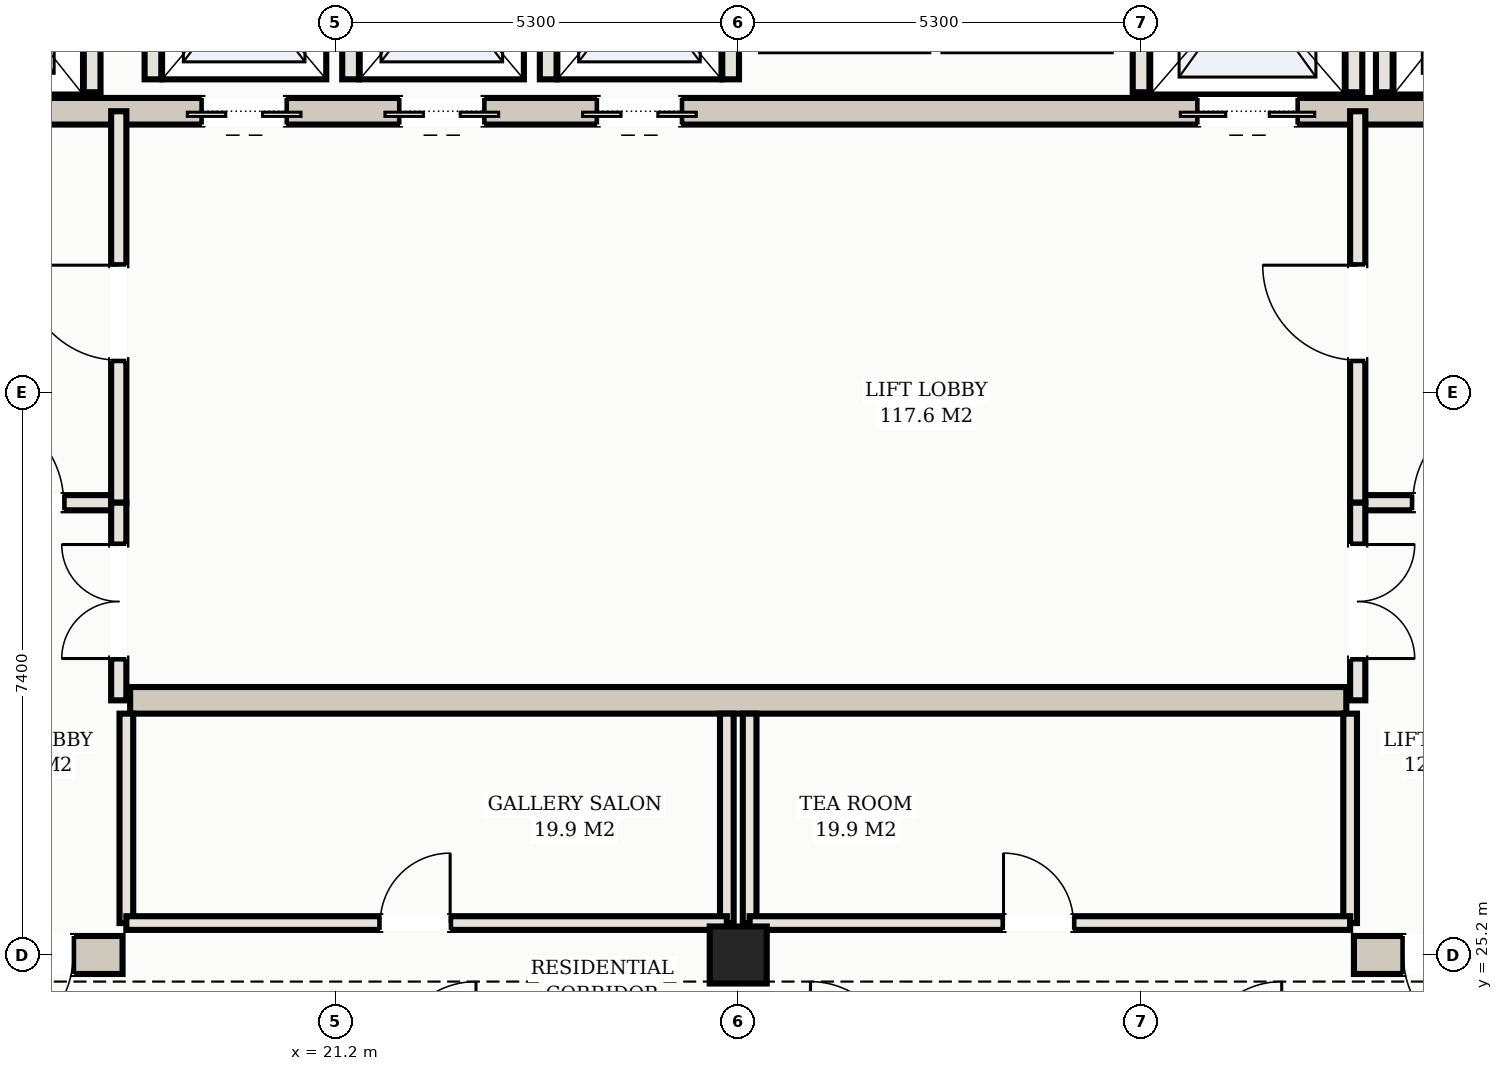
"""IFC4 building model, lengths in metres.
Left out: names, types, materials, properties, quantities, classifications, styles, units other than length and angle.
Written with IfcOpenShell. Run it as: python <this file> out.ifc"""

import sys

from ifc_helpers import new_model, si_unit, direction, frame, frame_2d, origin, origin_2d, place, context, subcontext, project, spatial, rectangle, hollow_rectangle, extrude, element, fill, save


model = new_model("IFC4")
c1 = context("Model", 3, precision=1e-05, world=origin(), true_north=direction((0.0, 1.0)))
c2 = subcontext(c1, "Body", "Model", "MODEL_VIEW")
j1 = project(units=[si_unit("LENGTHUNIT", "METRE"), si_unit("PLANEANGLEUNIT", "RADIAN")], contexts=[c1])
p1 = place(None, origin())
s1 = spatial("IfcSite", under=j1, at=p1, CompositionType="ELEMENT")
p2 = place(p1, origin())
s2 = spatial("IfcBuilding", under=s1, at=p2, CompositionType="ELEMENT")
p3 = place(p2, frame((0.0, 0.0, 233.0)))
s3 = spatial("IfcBuildingStorey", under=s2, at=p3, CompositionType="ELEMENT", Elevation=233.0)
p4 = place(p3, frame((10.35, 25.2, 0.0), z_axis=(0.0, 0.0, 1.0), x_axis=(1.0, 0.0, 0.0)))
e1 = element("IfcWall", 1, at=p4, inside=s3, PredefinedType="SHEAR", context=c2, shape_type="SweptSolid", body=[
    extrude(rectangle(XDim=8.05, YDim=0.5, at=frame_2d((4.025, 0.0))), origin(), (0.0, 0.0, 1.0), 3.11),
])
p5 = place(p4, frame((6.15, 0.0, 0.0)))
e2 = element("IfcOpeningElement", 2, at=p5, cuts=e1, PredefinedType="OPENING", context=c2, shape_type="SweptSolid", body=[
    extrude(rectangle(XDim=1.25, YDim=2.2, at=frame_2d((0.625, 1.1))), frame((0.0, 0.26, 0.0), z_axis=(0.0, -1.0, 0.0), x_axis=(1.0, 0.0, 0.0)), (0.0, 0.0, 1.0), 0.52),
])
p6 = place(p3, frame((34.6, 25.2, 0.0), z_axis=(0.0, 0.0, 1.0), x_axis=(1.0, 0.0, 0.0)))
e3 = element("IfcWall", 3, at=p6, inside=s3, PredefinedType="SHEAR", context=c2, shape_type="SweptSolid", body=[
    extrude(rectangle(XDim=8.05, YDim=0.5, at=frame_2d((4.025, 0.0))), origin(), (0.0, 0.0, 1.0), 3.11),
])
p7 = place(p6, frame((0.65, 0.0, 0.0)))
e4 = element("IfcOpeningElement", 4, at=p7, cuts=e3, PredefinedType="OPENING", context=c2, shape_type="SweptSolid", body=[
    extrude(rectangle(XDim=1.25, YDim=2.2, at=frame_2d((0.625, 1.1))), frame((0.0, 0.26, 0.0), z_axis=(0.0, -1.0, 0.0), x_axis=(1.0, 0.0, 0.0)), (0.0, 0.0, 1.0), 0.52),
])
p8 = place(p3, frame((15.5, 36.3, 0.0), z_axis=(0.0, 0.0, 1.0), x_axis=(1.0, 0.0, 0.0)))
e5 = element("IfcWall", 5, at=p8, inside=s3, PredefinedType="SHEAR", context=c2, shape_type="SweptSolid", body=[
    extrude(rectangle(XDim=22.0, YDim=0.35, at=frame_2d((11.0, 0.0))), origin(), (0.0, 0.0, 1.0), 3.11),
])
p9 = place(p8, frame((0.65, 0.0, 0.0)))
e6 = element("IfcOpeningElement", 6, at=p9, cuts=e5, PredefinedType="OPENING", context=c2, shape_type="SweptSolid", body=[
    extrude(rectangle(XDim=1.1, YDim=2.15, at=frame_2d((0.55, 1.075))), frame((0.0, 0.185, 0.0), z_axis=(0.0, -1.0, 0.0), x_axis=(1.0, 0.0, 0.0)), (0.0, 0.0, 1.0), 0.37),
])
p10 = place(p8, frame((20.25, 0.0, 0.0)))
e7 = element("IfcOpeningElement", 7, at=p10, cuts=e5, PredefinedType="OPENING", context=c2, shape_type="SweptSolid", body=[
    extrude(rectangle(XDim=1.1, YDim=2.15, at=frame_2d((0.55, 1.075))), frame((0.0, 0.185, 0.0), z_axis=(0.0, -1.0, 0.0), x_axis=(1.0, 0.0, 0.0)), (0.0, 0.0, 1.0), 0.37),
])
p11 = place(p8, frame((17.05, 0.0, 0.0)))
e8 = element("IfcOpeningElement", 8, at=p11, cuts=e5, PredefinedType="OPENING", context=c2, shape_type="SweptSolid", body=[
    extrude(rectangle(XDim=1.3, YDim=2.2, at=frame_2d((0.65, 1.1))), frame((0.0, 0.185, 0.0), z_axis=(0.0, -1.0, 0.0), x_axis=(1.0, 0.0, 0.0)), (0.0, 0.0, 1.0), 0.37),
])
p12 = place(p8, frame((3.95, 0.0, 0.0)))
e9 = element("IfcOpeningElement", 9, at=p12, cuts=e5, PredefinedType="OPENING", context=c2, shape_type="SweptSolid", body=[
    extrude(rectangle(XDim=1.1, YDim=2.15, at=frame_2d((0.55, 1.075))), frame((0.0, 0.185, 0.0), z_axis=(0.0, -1.0, 0.0), x_axis=(1.0, 0.0, 0.0)), (0.0, 0.0, 1.0), 0.37),
])
p13 = place(p8, frame((6.55, 0.0, 0.0)))
e10 = element("IfcOpeningElement", 10, at=p13, cuts=e5, PredefinedType="OPENING", context=c2, shape_type="SweptSolid", body=[
    extrude(rectangle(XDim=1.1, YDim=2.15, at=frame_2d((0.55, 1.075))), frame((0.0, 0.185, 0.0), z_axis=(0.0, -1.0, 0.0), x_axis=(1.0, 0.0, 0.0)), (0.0, 0.0, 1.0), 0.37),
])
p14 = place(p8, frame((9.15, 0.0, 0.0)))
e11 = element("IfcOpeningElement", 11, at=p14, cuts=e5, PredefinedType="OPENING", context=c2, shape_type="SweptSolid", body=[
    extrude(rectangle(XDim=1.1, YDim=2.15, at=frame_2d((0.55, 1.075))), frame((0.0, 0.185, 0.0), z_axis=(0.0, -1.0, 0.0), x_axis=(1.0, 0.0, 0.0)), (0.0, 0.0, 1.0), 0.37),
])
p15 = place(p3, frame((18.5, 28.55, 0.0), z_axis=(0.0, 0.0, 1.0), x_axis=(1.0, 0.0, 0.0)))
e12 = element("IfcWall", 12, at=p15, inside=s3, PredefinedType="SHEAR", context=c2, shape_type="SweptSolid", body=[
    extrude(rectangle(XDim=16.0, YDim=0.35, at=frame_2d((8.0, 0.0))), origin(), (0.0, 0.0, 1.0), 3.11),
])
p16 = place(p3, frame((26.5, 25.2, 0.0), z_axis=(0.0, 0.0, 1.0), x_axis=(1.0, 0.0, 0.0)))
e13 = element("IfcColumn", 13, at=p16, inside=s3, PredefinedType="COLUMN", context=c2, shape_type="SweptSolid", body=[
    extrude(hollow_rectangle(XDim=0.75, YDim=0.75, WallThickness=0.025, at=origin_2d()), origin(), (0.0, 0.0, 1.0), 3.3),
])
for number, where, z_axis, x_axis in (
    (14, (18.0, 36.55, 0.0), (0.0, 0.0, 1.0), (0.0, 1.0, 0.0)),
    (15, (35.0, 36.55, 0.0), (0.0, 0.0, 1.0), (0.0, 1.0, 0.0)),
    (16, (31.8, 36.55, 0.0), (0.0, 0.0, 1.0), (0.0, 1.0, 0.0)),
    (17, (34.6, 36.55, 0.0), (0.0, 0.0, 1.0), (0.0, 1.0, 0.0)),
):
    element("IfcWall", number, at=place(p3, frame(where, z_axis=z_axis, x_axis=x_axis)), inside=s3, PredefinedType="SOLIDWALL", context=c2, shape_type="SweptSolid", body=[
        extrude(rectangle(XDim=2.93, YDim=0.22, at=frame_2d((1.465, 0.0))), origin(), (0.0, 0.0, 1.0), 3.11),
    ])
for number, where, z_axis, x_axis in (
    (18, (18.8, 36.72, 0.0), (0.0, 0.0, 1.0), (0.0, 1.0, 0.0)),
    (19, (21.4, 36.72, 0.0), (0.0, 0.0, 1.0), (0.0, 1.0, 0.0)),
    (20, (24.0, 36.72, 0.0), (0.0, 0.0, 1.0), (0.0, 1.0, 0.0)),
    (21, (26.4, 36.72, 0.0), (0.0, 0.0, 1.0), (0.0, 1.0, 0.0)),
):
    element("IfcWall", number, at=place(p3, frame(where, z_axis=z_axis, x_axis=x_axis)), inside=s3, PredefinedType="SOLIDWALL", context=c2, shape_type="SweptSolid", body=[
        extrude(rectangle(XDim=2.56, YDim=0.22, at=frame_2d((1.28, 0.0))), origin(), (0.0, 0.0, 1.0), 3.11),
    ])
p17 = place(p3, frame((15.1, 31.15, 0.0), z_axis=(0.0, 0.0, 1.0), x_axis=(1.0, 0.0, 0.0)))
e22 = element("IfcWall", 22, at=p17, inside=s3, PredefinedType="PARTITIONING", context=c2, shape_type="SweptSolid", body=[
    extrude(rectangle(XDim=3.25, YDim=0.2, at=frame_2d((1.625, 0.0))), origin(), (0.0, 0.0, 1.0), 2.45),
])
p18 = place(p17, frame((1.275, 0.0, 0.0)))
e23 = element("IfcOpeningElement", 23, at=p18, cuts=e22, PredefinedType="OPENING", context=c2, shape_type="SweptSolid", body=[
    extrude(rectangle(XDim=1.25, YDim=2.2, at=frame_2d((0.625, 1.1))), frame((0.0, 0.11, 0.0), z_axis=(0.0, -1.0, 0.0), x_axis=(1.0, 0.0, 0.0)), (0.0, 0.0, 1.0), 0.22),
])
p19 = place(p3, frame((18.35, 31.15, 0.0), z_axis=(0.0, 0.0, 1.0), x_axis=(0.0, 1.0, 0.0)))
e24 = element("IfcWall", 24, at=p19, inside=s3, PredefinedType="PARTITIONING", context=c2, shape_type="SweptSolid", body=[
    extrude(rectangle(XDim=5.15, YDim=0.2, at=frame_2d((2.575, 0.0))), origin(), (0.0, 0.0, 1.0), 2.45),
])
p20 = place(p19, frame((1.875, 0.0, 0.0)))
e25 = element("IfcOpeningElement", 25, at=p20, cuts=e24, PredefinedType="OPENING", context=c2, shape_type="SweptSolid", body=[
    extrude(rectangle(XDim=1.25, YDim=2.2, at=frame_2d((0.625, 1.1))), frame((0.0, 0.11, 0.0), z_axis=(0.0, -1.0, 0.0), x_axis=(1.0, 0.0, 0.0)), (0.0, 0.0, 1.0), 0.22),
])
p21 = place(p3, frame((34.65, 31.15, 0.0), z_axis=(0.0, 0.0, 1.0), x_axis=(1.0, 0.0, 0.0)))
e26 = element("IfcWall", 26, at=p21, inside=s3, PredefinedType="PARTITIONING", context=c2, shape_type="SweptSolid", body=[
    extrude(rectangle(XDim=3.25, YDim=0.2, at=frame_2d((1.625, 0.0))), origin(), (0.0, 0.0, 1.0), 2.45),
])
p22 = place(p21, frame((0.725, 0.0, 0.0)))
e27 = element("IfcOpeningElement", 27, at=p22, cuts=e26, PredefinedType="OPENING", context=c2, shape_type="SweptSolid", body=[
    extrude(rectangle(XDim=1.25, YDim=2.2, at=frame_2d((0.625, 1.1))), frame((0.0, 0.11, 0.0), z_axis=(0.0, -1.0, 0.0), x_axis=(1.0, 0.0, 0.0)), (0.0, 0.0, 1.0), 0.22),
])
p23 = place(p3, frame((34.65, 31.15, 0.0), z_axis=(0.0, 0.0, 1.0), x_axis=(0.0, 1.0, 0.0)))
e28 = element("IfcWall", 28, at=p23, inside=s3, PredefinedType="PARTITIONING", context=c2, shape_type="SweptSolid", body=[
    extrude(rectangle(XDim=5.15, YDim=0.2, at=frame_2d((2.575, 0.0))), origin(), (0.0, 0.0, 1.0), 2.45),
])
p24 = place(p23, frame((1.875, 0.0, 0.0)))
e29 = element("IfcOpeningElement", 29, at=p24, cuts=e28, PredefinedType="OPENING", context=c2, shape_type="SweptSolid", body=[
    extrude(rectangle(XDim=1.25, YDim=2.2, at=frame_2d((0.625, 1.1))), frame((0.0, 0.11, 0.0), z_axis=(0.0, -1.0, 0.0), x_axis=(1.0, 0.0, 0.0)), (0.0, 0.0, 1.0), 0.22),
])
p25 = place(p3, frame((18.35, 28.55, 0.0), z_axis=(0.0, 0.0, 1.0), x_axis=(0.0, 1.0, 0.0)))
e30 = element("IfcWall", 30, at=p25, inside=s3, PredefinedType="PARTITIONING", context=c2, shape_type="SweptSolid", body=[
    extrude(rectangle(XDim=2.6, YDim=0.2, at=frame_2d((1.3, 0.0))), origin(), (0.0, 0.0, 1.0), 2.45),
])
p26 = place(p25, frame((0.55, 0.0, 0.0)))
e31 = element("IfcOpeningElement", 31, at=p26, cuts=e30, PredefinedType="OPENING", context=c2, shape_type="SweptSolid", body=[
    extrude(rectangle(XDim=1.5, YDim=2.25, at=frame_2d((0.75, 1.125))), frame((0.0, 0.11, 0.0), z_axis=(0.0, -1.0, 0.0), x_axis=(1.0, 0.0, 0.0)), (0.0, 0.0, 1.0), 0.22),
])
p27 = place(p3, frame((34.65, 28.55, 0.0), z_axis=(0.0, 0.0, 1.0), x_axis=(0.0, 1.0, 0.0)))
e32 = element("IfcWall", 32, at=p27, inside=s3, PredefinedType="PARTITIONING", context=c2, shape_type="SweptSolid", body=[
    extrude(rectangle(XDim=2.6, YDim=0.2, at=frame_2d((1.3, 0.0))), origin(), (0.0, 0.0, 1.0), 2.45),
])
p28 = place(p27, frame((0.55, 0.0, 0.0)))
e33 = element("IfcOpeningElement", 33, at=p28, cuts=e32, PredefinedType="OPENING", context=c2, shape_type="SweptSolid", body=[
    extrude(rectangle(XDim=1.5, YDim=2.25, at=frame_2d((0.75, 1.125))), frame((0.0, 0.11, 0.0), z_axis=(0.0, -1.0, 0.0), x_axis=(1.0, 0.0, 0.0)), (0.0, 0.0, 1.0), 0.22),
])
for number, where, z_axis, x_axis in (
    (34, (18.45, 25.62, 0.0), (0.0, 0.0, 1.0), (0.0, 1.0, 0.0)),
    (35, (26.35, 25.62, 0.0), (0.0, 0.0, 1.0), (0.0, 1.0, 0.0)),
):
    element("IfcWall", number, at=place(p3, frame(where, z_axis=z_axis, x_axis=x_axis)), inside=s3, PredefinedType="PARTITIONING", context=c2, shape_type="SweptSolid", body=[
        extrude(rectangle(XDim=2.755, YDim=0.18, at=frame_2d((1.377, 0.0))), origin(), (0.0, 0.0, 1.0), 2.45),
    ])
p29 = place(p3, frame((18.45, 25.62, 0.0), z_axis=(0.0, 0.0, 1.0), x_axis=(1.0, 0.0, 0.0)))
e36 = element("IfcWall", 36, at=p29, inside=s3, PredefinedType="PARTITIONING", context=c2, shape_type="SweptSolid", body=[
    extrude(rectangle(XDim=7.9, YDim=0.18, at=frame_2d((3.95, 0.0))), origin(), (0.0, 0.0, 1.0), 2.45),
])
p30 = place(p29, frame((3.34, 0.0, 0.0)))
e37 = element("IfcOpeningElement", 37, at=p30, cuts=e36, PredefinedType="OPENING", context=c2, shape_type="SweptSolid", body=[
    extrude(rectangle(XDim=0.92, YDim=2.15, at=frame_2d((0.46, 1.075))), frame((0.0, 0.1, 0.0), z_axis=(0.0, -1.0, 0.0), x_axis=(1.0, 0.0, 0.0)), (0.0, 0.0, 1.0), 0.2),
])
for number, where, z_axis, x_axis in (
    (38, (26.65, 25.62, 0.0), (0.0, 0.0, 1.0), (0.0, 1.0, 0.0)),
    (39, (34.55, 25.62, 0.0), (0.0, 0.0, 1.0), (0.0, 1.0, 0.0)),
):
    element("IfcWall", number, at=place(p3, frame(where, z_axis=z_axis, x_axis=x_axis)), inside=s3, PredefinedType="PARTITIONING", context=c2, shape_type="SweptSolid", body=[
        extrude(rectangle(XDim=2.755, YDim=0.18, at=frame_2d((1.377, 0.0))), origin(), (0.0, 0.0, 1.0), 2.45),
    ])
p31 = place(p3, frame((26.65, 25.62, 0.0), z_axis=(0.0, 0.0, 1.0), x_axis=(1.0, 0.0, 0.0)))
e40 = element("IfcWall", 40, at=p31, inside=s3, PredefinedType="PARTITIONING", context=c2, shape_type="SweptSolid", body=[
    extrude(rectangle(XDim=7.9, YDim=0.18, at=frame_2d((3.95, 0.0))), origin(), (0.0, 0.0, 1.0), 2.45),
])
p32 = place(p31, frame((3.34, 0.0, 0.0)))
e41 = element("IfcOpeningElement", 41, at=p32, cuts=e40, PredefinedType="OPENING", context=c2, shape_type="SweptSolid", body=[
    extrude(rectangle(XDim=0.92, YDim=2.15, at=frame_2d((0.46, 1.075))), frame((0.0, 0.1, 0.0), z_axis=(0.0, -1.0, 0.0), x_axis=(1.0, 0.0, 0.0)), (0.0, 0.0, 1.0), 0.2),
])
p33 = place(p11, frame((1.3, 0.0, 0.0), z_axis=(0.0, 0.0, 1.0), x_axis=(-1.0, 0.0, 0.0)))
e42 = element("IfcDoor", 42, at=p33, inside=s3, OperationType="DOUBLE_DOOR_SLIDING", PredefinedType="DOOR", context=c2, shape_type="SweptSolid", body=[
    extrude(rectangle(XDim=1.3, YDim=2.2, at=frame_2d((0.65, 1.1))), frame((0.0, 0.025, 0.0), z_axis=(0.0, -1.0, 0.0), x_axis=(1.0, 0.0, 0.0)), (0.0, 0.0, 1.0), 0.05),
])
fill(e8, e42)
p34 = place(p12, frame((1.1, 0.0, 0.0), z_axis=(0.0, 0.0, 1.0), x_axis=(-1.0, 0.0, 0.0)))
e43 = element("IfcDoor", 43, at=p34, inside=s3, OperationType="DOUBLE_DOOR_SLIDING", PredefinedType="DOOR", context=c2, shape_type="SweptSolid", body=[
    extrude(rectangle(XDim=1.1, YDim=2.15, at=frame_2d((0.55, 1.075))), frame((0.0, 0.025, 0.0), z_axis=(0.0, -1.0, 0.0), x_axis=(1.0, 0.0, 0.0)), (0.0, 0.0, 1.0), 0.05),
])
fill(e9, e43)
p35 = place(p13, frame((1.1, 0.0, 0.0), z_axis=(0.0, 0.0, 1.0), x_axis=(-1.0, 0.0, 0.0)))
e44 = element("IfcDoor", 44, at=p35, inside=s3, OperationType="DOUBLE_DOOR_SLIDING", PredefinedType="DOOR", context=c2, shape_type="SweptSolid", body=[
    extrude(rectangle(XDim=1.1, YDim=2.15, at=frame_2d((0.55, 1.075))), frame((0.0, 0.025, 0.0), z_axis=(0.0, -1.0, 0.0), x_axis=(1.0, 0.0, 0.0)), (0.0, 0.0, 1.0), 0.05),
])
fill(e10, e44)
p36 = place(p14, frame((1.1, 0.0, 0.0), z_axis=(0.0, 0.0, 1.0), x_axis=(-1.0, 0.0, 0.0)))
e45 = element("IfcDoor", 45, at=p36, inside=s3, OperationType="DOUBLE_DOOR_SLIDING", PredefinedType="DOOR", context=c2, shape_type="SweptSolid", body=[
    extrude(rectangle(XDim=1.1, YDim=2.15, at=frame_2d((0.55, 1.075))), frame((0.0, 0.025, 0.0), z_axis=(0.0, -1.0, 0.0), x_axis=(1.0, 0.0, 0.0)), (0.0, 0.0, 1.0), 0.05),
])
fill(e11, e45)
p37 = place(p5, frame((1.25, 0.0, 0.0), z_axis=(0.0, 0.0, 1.0), x_axis=(-1.0, 0.0, 0.0)))
e46 = element("IfcDoor", 46, at=p37, inside=s3, OperationType="SINGLE_SWING_RIGHT", PredefinedType="DOOR", context=c2, shape_type="SweptSolid", body=[
    extrude(rectangle(XDim=1.25, YDim=2.2, at=frame_2d((0.625, 1.1))), frame((0.0, 0.025, 0.0), z_axis=(0.0, -1.0, 0.0), x_axis=(1.0, 0.0, 0.0)), (0.0, 0.0, 1.0), 0.05),
])
fill(e2, e46)
p38 = place(p7, frame((1.25, 0.0, 0.0), z_axis=(0.0, 0.0, 1.0), x_axis=(-1.0, 0.0, 0.0)))
e47 = element("IfcDoor", 47, at=p38, inside=s3, OperationType="SINGLE_SWING_LEFT", PredefinedType="DOOR", context=c2, shape_type="SweptSolid", body=[
    extrude(rectangle(XDim=1.25, YDim=2.2, at=frame_2d((0.625, 1.1))), frame((0.0, 0.025, 0.0), z_axis=(0.0, -1.0, 0.0), x_axis=(1.0, 0.0, 0.0)), (0.0, 0.0, 1.0), 0.05),
])
fill(e4, e47)
p39 = place(p18, origin())
e48 = element("IfcDoor", 48, at=p39, inside=s3, OperationType="SINGLE_SWING_LEFT", PredefinedType="DOOR", context=c2, shape_type="SweptSolid", body=[
    extrude(rectangle(XDim=1.25, YDim=2.2, at=frame_2d((0.625, 1.1))), frame((0.0, 0.025, 0.0), z_axis=(0.0, -1.0, 0.0), x_axis=(1.0, 0.0, 0.0)), (0.0, 0.0, 1.0), 0.05),
])
fill(e23, e48)
p40 = place(p20, origin())
e49 = element("IfcDoor", 49, at=p40, inside=s3, OperationType="SINGLE_SWING_RIGHT", PredefinedType="DOOR", context=c2, shape_type="SweptSolid", body=[
    extrude(rectangle(XDim=1.25, YDim=2.2, at=frame_2d((0.625, 1.1))), frame((0.0, 0.025, 0.0), z_axis=(0.0, -1.0, 0.0), x_axis=(1.0, 0.0, 0.0)), (0.0, 0.0, 1.0), 0.05),
])
fill(e25, e49)
p41 = place(p22, origin())
e50 = element("IfcDoor", 50, at=p41, inside=s3, OperationType="SINGLE_SWING_RIGHT", PredefinedType="DOOR", context=c2, shape_type="SweptSolid", body=[
    extrude(rectangle(XDim=1.25, YDim=2.2, at=frame_2d((0.625, 1.1))), frame((0.0, 0.025, 0.0), z_axis=(0.0, -1.0, 0.0), x_axis=(1.0, 0.0, 0.0)), (0.0, 0.0, 1.0), 0.05),
])
fill(e27, e50)
p42 = place(p24, origin())
e51 = element("IfcDoor", 51, at=p42, inside=s3, OperationType="SINGLE_SWING_RIGHT", PredefinedType="DOOR", context=c2, shape_type="SweptSolid", body=[
    extrude(rectangle(XDim=1.25, YDim=2.2, at=frame_2d((0.625, 1.1))), frame((0.0, 0.025, 0.0), z_axis=(0.0, -1.0, 0.0), x_axis=(1.0, 0.0, 0.0)), (0.0, 0.0, 1.0), 0.05),
])
fill(e29, e51)
p43 = place(p26, origin())
e52 = element("IfcDoor", 52, at=p43, inside=s3, OperationType="DOUBLE_DOOR_SINGLE_SWING", PredefinedType="DOOR", context=c2, shape_type="SweptSolid", body=[
    extrude(rectangle(XDim=1.5, YDim=2.25, at=frame_2d((0.75, 1.125))), frame((0.0, 0.025, 0.0), z_axis=(0.0, -1.0, 0.0), x_axis=(1.0, 0.0, 0.0)), (0.0, 0.0, 1.0), 0.05),
])
fill(e31, e52)
p44 = place(p28, frame((1.5, 0.0, 0.0), z_axis=(0.0, 0.0, 1.0), x_axis=(-1.0, 0.0, 0.0)))
e53 = element("IfcDoor", 53, at=p44, inside=s3, OperationType="DOUBLE_DOOR_SINGLE_SWING", PredefinedType="DOOR", context=c2, shape_type="SweptSolid", body=[
    extrude(rectangle(XDim=1.5, YDim=2.25, at=frame_2d((0.75, 1.125))), frame((0.0, 0.025, 0.0), z_axis=(0.0, -1.0, 0.0), x_axis=(1.0, 0.0, 0.0)), (0.0, 0.0, 1.0), 0.05),
])
fill(e33, e53)
p45 = place(p30, origin())
e54 = element("IfcDoor", 54, at=p45, inside=s3, OperationType="SINGLE_SWING_RIGHT", PredefinedType="DOOR", context=c2, shape_type="SweptSolid", body=[
    extrude(rectangle(XDim=0.92, YDim=2.15, at=frame_2d((0.46, 1.075))), frame((0.0, 0.025, 0.0), z_axis=(0.0, -1.0, 0.0), x_axis=(1.0, 0.0, 0.0)), (0.0, 0.0, 1.0), 0.05),
])
fill(e37, e54)
p46 = place(p32, origin())
e55 = element("IfcDoor", 55, at=p46, inside=s3, OperationType="SINGLE_SWING_LEFT", PredefinedType="DOOR", context=c2, shape_type="SweptSolid", body=[
    extrude(rectangle(XDim=0.92, YDim=2.15, at=frame_2d((0.46, 1.075))), frame((0.0, 0.025, 0.0), z_axis=(0.0, -1.0, 0.0), x_axis=(1.0, 0.0, 0.0)), (0.0, 0.0, 1.0), 0.05),
])
fill(e41, e55)
save(model, sys.argv[1])
